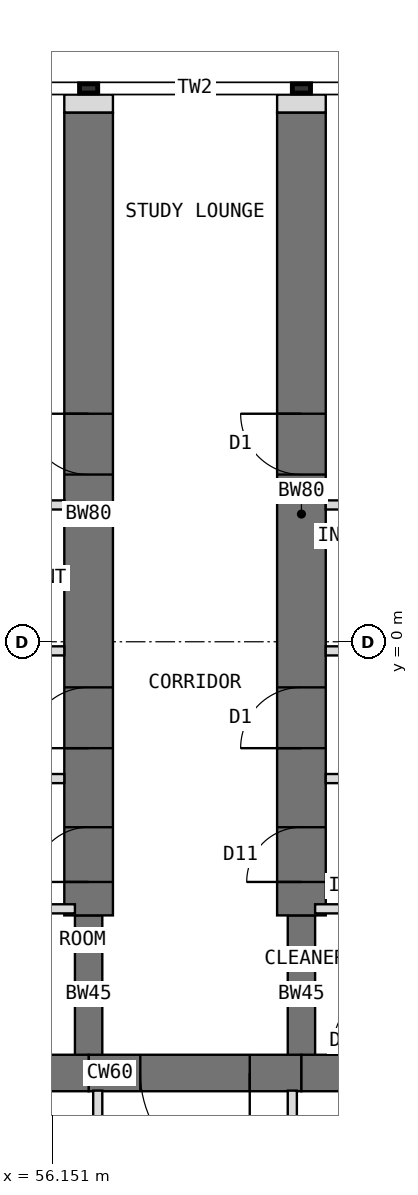
"""IFC4 building model, lengths in metres.
Left out: names, types, materials, properties, quantities, classifications, styles, units other than length and angle.
Written with IfcOpenShell. Run it as: python <this file> out.ifc"""

import sys

from ifc_helpers import new_model, si_unit, direction, frame, frame_2d, origin, place, context, subcontext, project, spatial, rectangle, extrude, element, fill, save


model = new_model("IFC4")
c1 = context("Model", 3, precision=1e-05, world=origin(), true_north=direction((0.0, 1.0)))
c2 = subcontext(c1, "Body", "Model", "MODEL_VIEW")
j1 = project(units=[si_unit("LENGTHUNIT", "METRE"), si_unit("PLANEANGLEUNIT", "RADIAN")], contexts=[c1])
p1 = place(None, origin())
s1 = spatial("IfcSite", under=j1, at=p1, CompositionType="ELEMENT")
p2 = place(p1, origin())
s2 = spatial("IfcBuilding", under=s1, at=p2, CompositionType="ELEMENT")
p3 = place(p2, frame((0.0, 0.0, 121.5)))
s3 = spatial("IfcBuildingStorey", under=s2, at=p3, CompositionType="ELEMENT", Elevation=121.5)
p4 = place(p3, frame((64.798, -7.092, 0.0), z_axis=(0.0, 0.0, 1.0), x_axis=(-1.0, 0.0, 0.0)))
e1 = element("IfcWall", 1, at=p4, inside=s3, PredefinedType="SHEAR", context=c2, shape_type="SweptSolid", body=[
    extrude(rectangle(XDim=4.548, YDim=0.6, at=frame_2d((2.274, 0.0))), origin(), (0.0, 0.0, 1.0), 4.0),
])
p5 = place(p3, frame((60.25, -7.092, 0.0), z_axis=(0.0, 0.0, 1.0), x_axis=(-1.0, 0.0, 0.0)))
e2 = element("IfcWall", 2, at=p5, inside=s3, PredefinedType="SHEAR", context=c2, shape_type="SweptSolid", body=[
    extrude(rectangle(XDim=3.5, YDim=0.6, at=frame_2d((1.75, 0.0))), origin(), (0.0, 0.0, 1.0), 4.0),
])
p6 = place(p5, frame((0.85, 0.0, 0.0)))
e3 = element("IfcOpeningElement", 3, at=p6, cuts=e2, PredefinedType="OPENING", context=c2, shape_type="SweptSolid", body=[
    extrude(rectangle(XDim=1.8, YDim=2.1, at=frame_2d((0.9, 1.05))), frame((0.0, 0.31, 0.0), z_axis=(0.0, -1.0, 0.0), x_axis=(1.0, 0.0, 0.0)), (0.0, 0.0, 1.0), 0.62),
])
p7 = place(p3, frame((56.75, -7.092, 0.0), z_axis=(0.0, 0.0, 1.0), x_axis=(-1.0, 0.0, 0.0)))
e4 = element("IfcWall", 4, at=p7, inside=s3, PredefinedType="SHEAR", context=c2, shape_type="SweptSolid", body=[
    extrude(rectangle(XDim=4.548, YDim=0.6, at=frame_2d((2.274, 0.0))), origin(), (0.0, 0.0, 1.0), 4.0),
])
p8 = place(p3, frame((56.75, -7.092, 0.0), z_axis=(0.0, 0.0, 1.0), x_axis=(0.0, 1.0, 0.0)))
e5 = element("IfcWall", 5, at=p8, inside=s3, PredefinedType="SHEAR", context=c2, shape_type="SweptSolid", body=[
    extrude(rectangle(XDim=2.592, YDim=0.45, at=frame_2d((1.296, 0.0))), origin(), (0.0, 0.0, 1.0), 4.0),
])
p9 = place(p3, frame((56.75, -4.5, 0.0), z_axis=(0.0, 0.0, 1.0), x_axis=(0.0, 1.0, 0.0)))
e6 = element("IfcWall", 6, at=p9, inside=s3, PredefinedType="SHEAR", context=c2, shape_type="SweptSolid", body=[
    extrude(rectangle(XDim=13.2, YDim=0.8, at=frame_2d((6.6, 0.0))), origin(), (0.0, 0.0, 1.0), 4.0),
])
p10 = place(p9, frame((0.55, 0.0, 0.0)))
e7 = element("IfcOpeningElement", 7, at=p10, cuts=e6, PredefinedType="OPENING", context=c2, shape_type="SweptSolid", body=[
    extrude(rectangle(XDim=0.9, YDim=2.1, at=frame_2d((0.45, 1.05))), frame((0.0, 0.41, 0.0), z_axis=(0.0, -1.0, 0.0), x_axis=(1.0, 0.0, 0.0)), (0.0, 0.0, 1.0), 0.82),
])
p11 = place(p9, frame((2.75, 0.0, 0.0)))
e8 = element("IfcOpeningElement", 8, at=p11, cuts=e6, PredefinedType="OPENING", context=c2, shape_type="SweptSolid", body=[
    extrude(rectangle(XDim=1.0, YDim=2.1, at=frame_2d((0.5, 1.05))), frame((0.0, 0.41, 0.0), z_axis=(0.0, -1.0, 0.0), x_axis=(1.0, 0.0, 0.0)), (0.0, 0.0, 1.0), 0.82),
])
p12 = place(p9, frame((7.25, 0.0, 0.0)))
e9 = element("IfcOpeningElement", 9, at=p12, cuts=e6, PredefinedType="OPENING", context=c2, shape_type="SweptSolid", body=[
    extrude(rectangle(XDim=1.0, YDim=2.1, at=frame_2d((0.5, 1.05))), frame((0.0, 0.41, 0.0), z_axis=(0.0, -1.0, 0.0), x_axis=(1.0, 0.0, 0.0)), (0.0, 0.0, 1.0), 0.82),
])
p13 = place(p3, frame((60.25, -7.092, 0.0), z_axis=(0.0, 0.0, 1.0), x_axis=(0.0, 1.0, 0.0)))
e10 = element("IfcWall", 10, at=p13, inside=s3, PredefinedType="SHEAR", context=c2, shape_type="SweptSolid", body=[
    extrude(rectangle(XDim=2.592, YDim=0.45, at=frame_2d((1.296, 0.0))), origin(), (0.0, 0.0, 1.0), 4.0),
])
p14 = place(p3, frame((60.25, -4.5, 0.0), z_axis=(0.0, 0.0, 1.0), x_axis=(0.0, 1.0, 0.0)))
e11 = element("IfcWall", 11, at=p14, inside=s3, PredefinedType="SHEAR", context=c2, shape_type="SweptSolid", body=[
    extrude(rectangle(XDim=13.2, YDim=0.8, at=frame_2d((6.6, 0.0))), origin(), (0.0, 0.0, 1.0), 4.0),
])
p15 = place(p14, frame((0.55, 0.0, 0.0)))
e12 = element("IfcOpeningElement", 12, at=p15, cuts=e11, PredefinedType="OPENING", context=c2, shape_type="SweptSolid", body=[
    extrude(rectangle(XDim=0.9, YDim=2.1, at=frame_2d((0.45, 1.05))), frame((0.0, 0.41, 0.0), z_axis=(0.0, -1.0, 0.0), x_axis=(1.0, 0.0, 0.0)), (0.0, 0.0, 1.0), 0.82),
])
p16 = place(p14, frame((2.75, 0.0, 0.0)))
e13 = element("IfcOpeningElement", 13, at=p16, cuts=e11, PredefinedType="OPENING", context=c2, shape_type="SweptSolid", body=[
    extrude(rectangle(XDim=1.0, YDim=2.1, at=frame_2d((0.5, 1.05))), frame((0.0, 0.41, 0.0), z_axis=(0.0, -1.0, 0.0), x_axis=(1.0, 0.0, 0.0)), (0.0, 0.0, 1.0), 0.82),
])
p17 = place(p14, frame((7.25, 0.0, 0.0)))
e14 = element("IfcOpeningElement", 14, at=p17, cuts=e11, PredefinedType="OPENING", context=c2, shape_type="SweptSolid", body=[
    extrude(rectangle(XDim=1.0, YDim=2.1, at=frame_2d((0.5, 1.05))), frame((0.0, 0.41, 0.0), z_axis=(0.0, -1.0, 0.0), x_axis=(1.0, 0.0, 0.0)), (0.0, 0.0, 1.0), 0.82),
])
for number, where, z_axis, x_axis in (
    (15, (56.75, 8.7, 0.0), (0.0, 0.0, 1.0), (0.0, 1.0, 0.0)),
    (16, (60.25, 8.7, 0.0), (0.0, 0.0, 1.0), (0.0, 1.0, 0.0)),
):
    element("IfcWall", number, at=place(p3, frame(where, z_axis=z_axis, x_axis=x_axis)), inside=s3, PredefinedType="PARTITIONING", context=c2, shape_type="SweptSolid", body=[
        extrude(rectangle(XDim=0.3, YDim=0.8, at=frame_2d((0.15, 0.0))), origin(), (0.0, 0.0, 1.0), 3.8),
    ])
for number, where, z_axis, x_axis in (
    (17, (56.35, -2.25, 0.0), (0.0, 0.0, 1.0), (-1.0, 0.0, 0.0)),
    (18, (56.35, 2.25, 0.0), (0.0, 0.0, 1.0), (-1.0, 0.0, 0.0)),
):
    element("IfcWall", number, at=place(p3, frame(where, z_axis=z_axis, x_axis=x_axis)), inside=s3, PredefinedType="PARTITIONING", context=c2, shape_type="SweptSolid", body=[
        extrude(rectangle(XDim=4.6, YDim=0.15, at=frame_2d((2.3, 0.0))), origin(), (0.0, 0.0, 1.0), 3.8),
    ])
p18 = place(p3, frame((56.35, -0.15, 0.0), z_axis=(0.0, 0.0, 1.0), x_axis=(-1.0, 0.0, 0.0)))
e19 = element("IfcWall", 19, at=p18, inside=s3, PredefinedType="PARTITIONING", context=c2, shape_type="SweptSolid", body=[
    extrude(rectangle(XDim=2.4, YDim=0.15, at=frame_2d((1.2, 0.0))), origin(), (0.0, 0.0, 1.0), 3.8),
])
p19 = place(p18, frame((0.7, 0.0, 0.0)))
e20 = element("IfcOpeningElement", 20, at=p19, cuts=e19, PredefinedType="OPENING", context=c2, shape_type="SweptSolid", body=[
    extrude(rectangle(XDim=1.0, YDim=2.1, at=frame_2d((0.5, 1.05))), frame((0.0, 0.085, 0.0), z_axis=(0.0, -1.0, 0.0), x_axis=(1.0, 0.0, 0.0)), (0.0, 0.0, 1.0), 0.17),
])
p20 = place(p3, frame((56.525, -4.392, 0.0), z_axis=(0.0, 0.0, 1.0), x_axis=(-1.0, 0.0, 0.0)))
e21 = element("IfcWall", 21, at=p20, inside=s3, PredefinedType="PARTITIONING", context=c2, shape_type="SweptSolid", body=[
    extrude(rectangle(XDim=3.2, YDim=0.15, at=frame_2d((1.6, 0.0))), origin(), (0.0, 0.0, 1.0), 3.8),
])
for number, where, z_axis, x_axis in (
    (22, (60.65, -2.25, 0.0), (0.0, 0.0, 1.0), (1.0, 0.0, 0.0)),
    (23, (60.65, 2.25, 0.0), (0.0, 0.0, 1.0), (1.0, 0.0, 0.0)),
):
    element("IfcWall", number, at=place(p3, frame(where, z_axis=z_axis, x_axis=x_axis)), inside=s3, PredefinedType="PARTITIONING", context=c2, shape_type="SweptSolid", body=[
        extrude(rectangle(XDim=4.6, YDim=0.15, at=frame_2d((2.3, 0.0))), origin(), (0.0, 0.0, 1.0), 3.8),
    ])
p21 = place(p3, frame((60.65, -0.15, 0.0), z_axis=(0.0, 0.0, 1.0), x_axis=(1.0, 0.0, 0.0)))
e24 = element("IfcWall", 24, at=p21, inside=s3, PredefinedType="PARTITIONING", context=c2, shape_type="SweptSolid", body=[
    extrude(rectangle(XDim=2.4, YDim=0.15, at=frame_2d((1.2, 0.0))), origin(), (0.0, 0.0, 1.0), 3.8),
])
p22 = place(p21, frame((0.7, 0.0, 0.0)))
e25 = element("IfcOpeningElement", 25, at=p22, cuts=e24, PredefinedType="OPENING", context=c2, shape_type="SweptSolid", body=[
    extrude(rectangle(XDim=1.0, YDim=2.1, at=frame_2d((0.5, 1.05))), frame((0.0, 0.085, 0.0), z_axis=(0.0, -1.0, 0.0), x_axis=(1.0, 0.0, 0.0)), (0.0, 0.0, 1.0), 0.17),
])
p23 = place(p3, frame((60.475, -4.392, 0.0), z_axis=(0.0, 0.0, 1.0), x_axis=(1.0, 0.0, 0.0)))
e26 = element("IfcWall", 26, at=p23, inside=s3, PredefinedType="PARTITIONING", context=c2, shape_type="SweptSolid", body=[
    extrude(rectangle(XDim=1.2, YDim=0.15, at=frame_2d((0.6, 0.0))), origin(), (0.0, 0.0, 1.0), 3.8),
])
p24 = place(p3, frame((56.9, -11.9, 0.0), z_axis=(0.0, 0.0, 1.0), x_axis=(0.0, 1.0, 0.0)))
e27 = element("IfcWall", 27, at=p24, inside=s3, PredefinedType="PARTITIONING", context=c2, shape_type="SweptSolid", body=[
    extrude(rectangle(XDim=4.519, YDim=0.15, at=frame_2d((2.259, 0.0))), origin(), (0.0, 0.0, 1.0), 3.8),
])
p25 = place(p24, frame((1.769, 0.0, 0.0)))
e28 = element("IfcOpeningElement", 28, at=p25, cuts=e27, PredefinedType="OPENING", context=c2, shape_type="SweptSolid", body=[
    extrude(rectangle(XDim=1.0, YDim=2.1, at=frame_2d((0.5, 1.05))), frame((0.0, 0.085, 0.0), z_axis=(0.0, -1.0, 0.0), x_axis=(1.0, 0.0, 0.0)), (0.0, 0.0, 1.0), 0.17),
])
p26 = place(p3, frame((60.1, -7.382, 0.0), z_axis=(0.0, 0.0, 1.0), x_axis=(0.0, -1.0, 0.0)))
e29 = element("IfcWall", 29, at=p26, inside=s3, PredefinedType="PARTITIONING", context=c2, shape_type="SweptSolid", body=[
    extrude(rectangle(XDim=4.519, YDim=0.15, at=frame_2d((2.259, 0.0))), origin(), (0.0, 0.0, 1.0), 3.8),
])
p27 = place(p26, frame((1.749, 0.0, 0.0)))
e30 = element("IfcOpeningElement", 30, at=p27, cuts=e29, PredefinedType="OPENING", context=c2, shape_type="SweptSolid", body=[
    extrude(rectangle(XDim=1.0, YDim=2.1, at=frame_2d((0.5, 1.05))), frame((0.0, 0.085, 0.0), z_axis=(0.0, -1.0, 0.0), x_axis=(1.0, 0.0, 0.0)), (0.0, 0.0, 1.0), 0.17),
])
p28 = place(p6, origin())
e31 = element("IfcDoor", 31, at=p28, inside=s3, OperationType="DOUBLE_DOOR_DOUBLE_SWING", PredefinedType="DOOR", context=c2, shape_type="SweptSolid", body=[
    extrude(rectangle(XDim=1.72, YDim=2.06, at=frame_2d((0.9, 1.03))), frame((0.0, 0.025, 0.0), z_axis=(0.0, -1.0, 0.0), x_axis=(1.0, 0.0, 0.0)), (0.0, 0.0, 1.0), 0.05),
    extrude(rectangle(XDim=0.04, YDim=2.1, at=frame_2d((0.02, 1.05))), frame((0.0, 0.3, 0.0), z_axis=(0.0, -1.0, 0.0), x_axis=(1.0, 0.0, 0.0)), (0.0, 0.0, 1.0), 0.6),
    extrude(rectangle(XDim=0.04, YDim=2.1, at=frame_2d((1.78, 1.05))), frame((0.0, 0.3, 0.0), z_axis=(0.0, -1.0, 0.0), x_axis=(1.0, 0.0, 0.0)), (0.0, 0.0, 1.0), 0.6),
    extrude(rectangle(XDim=1.72, YDim=0.04, at=frame_2d((0.9, 2.08))), frame((0.0, 0.3, 0.0), z_axis=(0.0, -1.0, 0.0), x_axis=(1.0, 0.0, 0.0)), (0.0, 0.0, 1.0), 0.6),
])
fill(e3, e31)
p29 = place(p10, origin())
e32 = element("IfcDoor", 32, at=p29, inside=s3, OperationType="SINGLE_SWING_LEFT", PredefinedType="DOOR", context=c2, shape_type="SweptSolid", body=[
    extrude(rectangle(XDim=0.82, YDim=2.06, at=frame_2d((0.45, 1.03))), frame((0.0, 0.025, 0.0), z_axis=(0.0, -1.0, 0.0), x_axis=(1.0, 0.0, 0.0)), (0.0, 0.0, 1.0), 0.05),
    extrude(rectangle(XDim=0.04, YDim=2.1, at=frame_2d((0.02, 1.05))), frame((0.0, 0.4, 0.0), z_axis=(0.0, -1.0, 0.0), x_axis=(1.0, 0.0, 0.0)), (0.0, 0.0, 1.0), 0.8),
    extrude(rectangle(XDim=0.04, YDim=2.1, at=frame_2d((0.88, 1.05))), frame((0.0, 0.4, 0.0), z_axis=(0.0, -1.0, 0.0), x_axis=(1.0, 0.0, 0.0)), (0.0, 0.0, 1.0), 0.8),
    extrude(rectangle(XDim=0.82, YDim=0.04, at=frame_2d((0.45, 2.08))), frame((0.0, 0.4, 0.0), z_axis=(0.0, -1.0, 0.0), x_axis=(1.0, 0.0, 0.0)), (0.0, 0.0, 1.0), 0.8),
])
fill(e7, e32)
p30 = place(p11, origin())
e33 = element("IfcDoor", 33, at=p30, inside=s3, OperationType="SINGLE_SWING_LEFT", PredefinedType="DOOR", context=c2, shape_type="SweptSolid", body=[
    extrude(rectangle(XDim=0.92, YDim=2.06, at=frame_2d((0.5, 1.03))), frame((0.0, 0.025, 0.0), z_axis=(0.0, -1.0, 0.0), x_axis=(1.0, 0.0, 0.0)), (0.0, 0.0, 1.0), 0.05),
    extrude(rectangle(XDim=0.04, YDim=2.1, at=frame_2d((0.02, 1.05))), frame((0.0, 0.4, 0.0), z_axis=(0.0, -1.0, 0.0), x_axis=(1.0, 0.0, 0.0)), (0.0, 0.0, 1.0), 0.8),
    extrude(rectangle(XDim=0.04, YDim=2.1, at=frame_2d((0.98, 1.05))), frame((0.0, 0.4, 0.0), z_axis=(0.0, -1.0, 0.0), x_axis=(1.0, 0.0, 0.0)), (0.0, 0.0, 1.0), 0.8),
    extrude(rectangle(XDim=0.92, YDim=0.04, at=frame_2d((0.5, 2.08))), frame((0.0, 0.4, 0.0), z_axis=(0.0, -1.0, 0.0), x_axis=(1.0, 0.0, 0.0)), (0.0, 0.0, 1.0), 0.8),
])
fill(e8, e33)
p31 = place(p12, origin())
e34 = element("IfcDoor", 34, at=p31, inside=s3, OperationType="SINGLE_SWING_RIGHT", PredefinedType="DOOR", context=c2, shape_type="SweptSolid", body=[
    extrude(rectangle(XDim=0.92, YDim=2.06, at=frame_2d((0.5, 1.03))), frame((0.0, 0.025, 0.0), z_axis=(0.0, -1.0, 0.0), x_axis=(1.0, 0.0, 0.0)), (0.0, 0.0, 1.0), 0.05),
    extrude(rectangle(XDim=0.04, YDim=2.1, at=frame_2d((0.02, 1.05))), frame((0.0, 0.4, 0.0), z_axis=(0.0, -1.0, 0.0), x_axis=(1.0, 0.0, 0.0)), (0.0, 0.0, 1.0), 0.8),
    extrude(rectangle(XDim=0.04, YDim=2.1, at=frame_2d((0.98, 1.05))), frame((0.0, 0.4, 0.0), z_axis=(0.0, -1.0, 0.0), x_axis=(1.0, 0.0, 0.0)), (0.0, 0.0, 1.0), 0.8),
    extrude(rectangle(XDim=0.92, YDim=0.04, at=frame_2d((0.5, 2.08))), frame((0.0, 0.4, 0.0), z_axis=(0.0, -1.0, 0.0), x_axis=(1.0, 0.0, 0.0)), (0.0, 0.0, 1.0), 0.8),
])
fill(e9, e34)
p32 = place(p15, origin())
e35 = element("IfcDoor", 35, at=p32, inside=s3, OperationType="SINGLE_SWING_LEFT", PredefinedType="DOOR", context=c2, shape_type="SweptSolid", body=[
    extrude(rectangle(XDim=0.82, YDim=2.06, at=frame_2d((0.45, 1.03))), frame((0.0, 0.025, 0.0), z_axis=(0.0, -1.0, 0.0), x_axis=(1.0, 0.0, 0.0)), (0.0, 0.0, 1.0), 0.05),
    extrude(rectangle(XDim=0.04, YDim=2.1, at=frame_2d((0.02, 1.05))), frame((0.0, 0.4, 0.0), z_axis=(0.0, -1.0, 0.0), x_axis=(1.0, 0.0, 0.0)), (0.0, 0.0, 1.0), 0.8),
    extrude(rectangle(XDim=0.04, YDim=2.1, at=frame_2d((0.88, 1.05))), frame((0.0, 0.4, 0.0), z_axis=(0.0, -1.0, 0.0), x_axis=(1.0, 0.0, 0.0)), (0.0, 0.0, 1.0), 0.8),
    extrude(rectangle(XDim=0.82, YDim=0.04, at=frame_2d((0.45, 2.08))), frame((0.0, 0.4, 0.0), z_axis=(0.0, -1.0, 0.0), x_axis=(1.0, 0.0, 0.0)), (0.0, 0.0, 1.0), 0.8),
])
fill(e12, e35)
p33 = place(p16, origin())
e36 = element("IfcDoor", 36, at=p33, inside=s3, OperationType="SINGLE_SWING_LEFT", PredefinedType="DOOR", context=c2, shape_type="SweptSolid", body=[
    extrude(rectangle(XDim=0.92, YDim=2.06, at=frame_2d((0.5, 1.03))), frame((0.0, 0.025, 0.0), z_axis=(0.0, -1.0, 0.0), x_axis=(1.0, 0.0, 0.0)), (0.0, 0.0, 1.0), 0.05),
    extrude(rectangle(XDim=0.04, YDim=2.1, at=frame_2d((0.02, 1.05))), frame((0.0, 0.4, 0.0), z_axis=(0.0, -1.0, 0.0), x_axis=(1.0, 0.0, 0.0)), (0.0, 0.0, 1.0), 0.8),
    extrude(rectangle(XDim=0.04, YDim=2.1, at=frame_2d((0.98, 1.05))), frame((0.0, 0.4, 0.0), z_axis=(0.0, -1.0, 0.0), x_axis=(1.0, 0.0, 0.0)), (0.0, 0.0, 1.0), 0.8),
    extrude(rectangle(XDim=0.92, YDim=0.04, at=frame_2d((0.5, 2.08))), frame((0.0, 0.4, 0.0), z_axis=(0.0, -1.0, 0.0), x_axis=(1.0, 0.0, 0.0)), (0.0, 0.0, 1.0), 0.8),
])
fill(e13, e36)
p34 = place(p17, origin())
e37 = element("IfcDoor", 37, at=p34, inside=s3, OperationType="SINGLE_SWING_RIGHT", PredefinedType="DOOR", context=c2, shape_type="SweptSolid", body=[
    extrude(rectangle(XDim=0.92, YDim=2.06, at=frame_2d((0.5, 1.03))), frame((0.0, 0.025, 0.0), z_axis=(0.0, -1.0, 0.0), x_axis=(1.0, 0.0, 0.0)), (0.0, 0.0, 1.0), 0.05),
    extrude(rectangle(XDim=0.04, YDim=2.1, at=frame_2d((0.02, 1.05))), frame((0.0, 0.4, 0.0), z_axis=(0.0, -1.0, 0.0), x_axis=(1.0, 0.0, 0.0)), (0.0, 0.0, 1.0), 0.8),
    extrude(rectangle(XDim=0.04, YDim=2.1, at=frame_2d((0.98, 1.05))), frame((0.0, 0.4, 0.0), z_axis=(0.0, -1.0, 0.0), x_axis=(1.0, 0.0, 0.0)), (0.0, 0.0, 1.0), 0.8),
    extrude(rectangle(XDim=0.92, YDim=0.04, at=frame_2d((0.5, 2.08))), frame((0.0, 0.4, 0.0), z_axis=(0.0, -1.0, 0.0), x_axis=(1.0, 0.0, 0.0)), (0.0, 0.0, 1.0), 0.8),
])
fill(e14, e37)
save(model, sys.argv[1])
